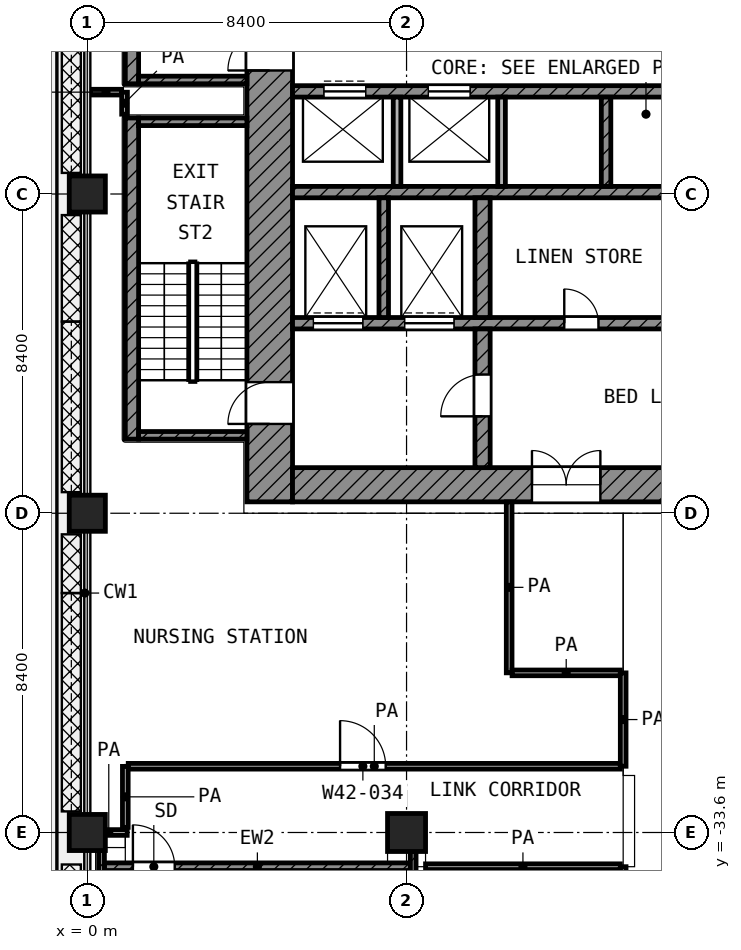
"""IFC4 building model, lengths in metres.
Left out: names, types, materials, properties, quantities, classifications, styles, units other than length and angle.
Written with IfcOpenShell. Run it as: python <this file> out.ifc"""

import sys

from ifc_helpers import new_model, si_unit, direction, frame, frame_2d, origin, origin_2d, place, context, subcontext, project, spatial, rectangle, extrude, element, fill, save


model = new_model("IFC4")
c1 = context("Model", 3, precision=1e-05, world=origin(), true_north=direction((0.0, 1.0)))
c2 = subcontext(c1, "Body", "Model", "MODEL_VIEW")
j1 = project(units=[si_unit("LENGTHUNIT", "METRE"), si_unit("PLANEANGLEUNIT", "RADIAN")], contexts=[c1])
p1 = place(None, origin())
s1 = spatial("IfcSite", under=j1, at=p1, CompositionType="ELEMENT")
p2 = place(p1, origin())
s2 = spatial("IfcBuilding", under=s1, at=p2, CompositionType="ELEMENT")
p3 = place(p2, frame((0.0, 0.0, 204.6)))
s3 = spatial("IfcBuildingStorey", under=s2, at=p3, CompositionType="ELEMENT", Elevation=204.6)
for number, where, z_axis, x_axis in (
    (1, (0.0, -16.8, 0.0), (0.0, 0.0, 1.0), (1.0, 0.0, 0.0)),
    (2, (0.0, -25.2, 0.0), (0.0, 0.0, 1.0), (1.0, 0.0, 0.0)),
    (3, (0.0, -33.6, 0.0), (0.0, 0.0, 1.0), (1.0, 0.0, 0.0)),
):
    element("IfcColumn", number, at=place(p3, frame(where, z_axis=z_axis, x_axis=x_axis)), inside=s3, PredefinedType="COLUMN", context=c2, shape_type="SweptSolid", body=[
        extrude(rectangle(XDim=0.95, YDim=0.95, at=origin_2d()), origin(), (0.0, 0.0, 1.0), 4.2),
    ])
p4 = place(p3, frame((8.4, -33.6, 0.0), z_axis=(0.0, 0.0, 1.0), x_axis=(1.0, 0.0, 0.0)))
e4 = element("IfcColumn", 4, at=p4, inside=s3, PredefinedType="COLUMN", context=c2, shape_type="SweptSolid", body=[
    extrude(rectangle(XDim=1.0, YDim=1.0, at=origin_2d()), origin(), (0.0, 0.0, 1.0), 4.2),
])
p5 = place(p3, frame((4.8, -24.9, 0.0), z_axis=(0.0, 0.0, 1.0), x_axis=(0.0, 1.0, 0.0)))
e5 = element("IfcWall", 5, at=p5, inside=s3, PredefinedType="SHEAR", context=c2, shape_type="SweptSolid", body=[
    extrude(rectangle(XDim=19.5, YDim=1.2, at=frame_2d((9.75, 0.0))), origin(), (0.0, 0.0, 1.0), 3.6),
])
p6 = place(p5, frame((11.35, 0.0, 0.0)))
e6 = element("IfcOpeningElement", 6, at=p6, cuts=e5, PredefinedType="OPENING", context=c2, shape_type="SweptSolid", body=[
    extrude(rectangle(XDim=1.1, YDim=2.1, at=frame_2d((0.55, 1.05))), frame((0.0, 0.61, 0.0), z_axis=(0.0, -1.0, 0.0), x_axis=(1.0, 0.0, 0.0)), (0.0, 0.0, 1.0), 1.22),
])
p7 = place(p5, frame((2.05, 0.0, 0.0)))
e7 = element("IfcOpeningElement", 7, at=p7, cuts=e5, PredefinedType="OPENING", context=c2, shape_type="SweptSolid", body=[
    extrude(rectangle(XDim=1.1, YDim=2.1, at=frame_2d((0.55, 1.05))), frame((0.0, 0.61, 0.0), z_axis=(0.0, -1.0, 0.0), x_axis=(1.0, 0.0, 0.0)), (0.0, 0.0, 1.0), 1.22),
])
p8 = place(p3, frame((5.4, -24.45, 0.0), z_axis=(0.0, 0.0, 1.0), x_axis=(1.0, 0.0, 0.0)))
e8 = element("IfcWall", 8, at=p8, inside=s3, PredefinedType="SHEAR", context=c2, shape_type="SweptSolid", body=[
    extrude(rectangle(XDim=18.6, YDim=0.9, at=frame_2d((9.3, 0.0))), origin(), (0.0, 0.0, 1.0), 3.6),
])
p9 = place(p8, frame((6.3, 0.0, 0.0)))
e9 = element("IfcOpeningElement", 9, at=p9, cuts=e8, PredefinedType="OPENING", context=c2, shape_type="SweptSolid", body=[
    extrude(rectangle(XDim=1.8, YDim=2.1, at=frame_2d((0.9, 1.05))), frame((0.0, 0.46, 0.0), z_axis=(0.0, -1.0, 0.0), x_axis=(1.0, 0.0, 0.0)), (0.0, 0.0, 1.0), 0.92),
])
p10 = place(p3, frame((5.4, -14.1, 0.0), z_axis=(0.0, 0.0, 1.0), x_axis=(1.0, 0.0, 0.0)))
e10 = element("IfcWall", 10, at=p10, inside=s3, PredefinedType="SHEAR", context=c2, shape_type="SweptSolid", body=[
    extrude(rectangle(XDim=16.65, YDim=0.3, at=frame_2d((8.325, 0.0))), origin(), (0.0, 0.0, 1.0), 3.6),
])
p11 = place(p10, frame((0.825, 0.0, 0.0)))
e11 = element("IfcOpeningElement", 11, at=p11, cuts=e10, PredefinedType="OPENING", context=c2, shape_type="SweptSolid", body=[
    extrude(rectangle(XDim=1.1, YDim=2.1, at=frame_2d((0.55, 1.05))), frame((0.0, 0.16, 0.0), z_axis=(0.0, -1.0, 0.0), x_axis=(1.0, 0.0, 0.0)), (0.0, 0.0, 1.0), 0.32),
])
p12 = place(p10, frame((3.575, 0.0, 0.0)))
e12 = element("IfcOpeningElement", 12, at=p12, cuts=e10, PredefinedType="OPENING", context=c2, shape_type="SweptSolid", body=[
    extrude(rectangle(XDim=1.1, YDim=2.1, at=frame_2d((0.55, 1.05))), frame((0.0, 0.16, 0.0), z_axis=(0.0, -1.0, 0.0), x_axis=(1.0, 0.0, 0.0)), (0.0, 0.0, 1.0), 0.32),
])
p13 = place(p3, frame((5.4, -16.75, 0.0), z_axis=(0.0, 0.0, 1.0), x_axis=(1.0, 0.0, 0.0)))
e13 = element("IfcWall", 13, at=p13, inside=s3, PredefinedType="SHEAR", context=c2, shape_type="SweptSolid", body=[
    extrude(rectangle(XDim=16.65, YDim=0.3, at=frame_2d((8.325, 0.0))), origin(), (0.0, 0.0, 1.0), 3.6),
])
p14 = place(p3, frame((5.4, -20.2, 0.0), z_axis=(0.0, 0.0, 1.0), x_axis=(1.0, 0.0, 0.0)))
e14 = element("IfcWall", 14, at=p14, inside=s3, PredefinedType="SHEAR", context=c2, shape_type="SweptSolid", body=[
    extrude(rectangle(XDim=14.65, YDim=0.3, at=frame_2d((7.325, 0.0))), origin(), (0.0, 0.0, 1.0), 3.6),
])
p15 = place(p14, frame((10.55, 0.0, 0.0)))
e15 = element("IfcOpeningElement", 15, at=p15, cuts=e14, PredefinedType="OPENING", context=c2, shape_type="SweptSolid", body=[
    extrude(rectangle(XDim=1.3, YDim=2.1, at=frame_2d((0.65, 1.05))), frame((0.0, 0.16, 0.0), z_axis=(0.0, -1.0, 0.0), x_axis=(1.0, 0.0, 0.0)), (0.0, 0.0, 1.0), 0.32),
])
p16 = place(p14, frame((12.95, 0.0, 0.0)))
e16 = element("IfcOpeningElement", 16, at=p16, cuts=e14, PredefinedType="OPENING", context=c2, shape_type="SweptSolid", body=[
    extrude(rectangle(XDim=1.3, YDim=2.1, at=frame_2d((0.65, 1.05))), frame((0.0, 0.16, 0.0), z_axis=(0.0, -1.0, 0.0), x_axis=(1.0, 0.0, 0.0)), (0.0, 0.0, 1.0), 0.32),
])
p17 = place(p14, frame((0.55, 0.0, 0.0)))
e17 = element("IfcOpeningElement", 17, at=p17, cuts=e14, PredefinedType="OPENING", context=c2, shape_type="SweptSolid", body=[
    extrude(rectangle(XDim=1.3, YDim=2.1, at=frame_2d((0.65, 1.05))), frame((0.0, 0.16, 0.0), z_axis=(0.0, -1.0, 0.0), x_axis=(1.0, 0.0, 0.0)), (0.0, 0.0, 1.0), 0.32),
])
p18 = place(p14, frame((2.95, 0.0, 0.0)))
e18 = element("IfcOpeningElement", 18, at=p18, cuts=e14, PredefinedType="OPENING", context=c2, shape_type="SweptSolid", body=[
    extrude(rectangle(XDim=1.3, YDim=2.1, at=frame_2d((0.65, 1.05))), frame((0.0, 0.16, 0.0), z_axis=(0.0, -1.0, 0.0), x_axis=(1.0, 0.0, 0.0)), (0.0, 0.0, 1.0), 0.32),
])
p19 = place(p14, frame((7.15, 0.0, 0.0)))
e19 = element("IfcOpeningElement", 19, at=p19, cuts=e14, PredefinedType="OPENING", context=c2, shape_type="SweptSolid", body=[
    extrude(rectangle(XDim=0.9, YDim=2.1, at=frame_2d((0.45, 1.05))), frame((0.0, 0.16, 0.0), z_axis=(0.0, -1.0, 0.0), x_axis=(1.0, 0.0, 0.0)), (0.0, 0.0, 1.0), 0.32),
])
p20 = place(p3, frame((10.4, -24.0, 0.0), z_axis=(0.0, 0.0, 1.0), x_axis=(0.0, 1.0, 0.0)))
e20 = element("IfcWall", 20, at=p20, inside=s3, PredefinedType="SHEAR", context=c2, shape_type="SweptSolid", body=[
    extrude(rectangle(XDim=3.65, YDim=0.4, at=frame_2d((1.825, 0.0))), origin(), (0.0, 0.0, 1.0), 3.6),
])
p21 = place(p20, frame((1.35, 0.0, 0.0)))
e21 = element("IfcOpeningElement", 21, at=p21, cuts=e20, PredefinedType="OPENING", context=c2, shape_type="SweptSolid", body=[
    extrude(rectangle(XDim=1.1, YDim=2.1, at=frame_2d((0.55, 1.05))), frame((0.0, 0.21, 0.0), z_axis=(0.0, -1.0, 0.0), x_axis=(1.0, 0.0, 0.0)), (0.0, 0.0, 1.0), 0.42),
])
p22 = place(p3, frame((10.4, -20.05, 0.0), z_axis=(0.0, 0.0, 1.0), x_axis=(0.0, 1.0, 0.0)))
e22 = element("IfcWall", 22, at=p22, inside=s3, PredefinedType="SHEAR", context=c2, shape_type="SweptSolid", body=[
    extrude(rectangle(XDim=3.15, YDim=0.4, at=frame_2d((1.575, 0.0))), origin(), (0.0, 0.0, 1.0), 3.6),
])
p23 = place(p3, frame((7.8, -20.05, 0.0), z_axis=(0.0, 0.0, 1.0), x_axis=(0.0, 1.0, 0.0)))
e23 = element("IfcWall", 23, at=p23, inside=s3, PredefinedType="SHEAR", context=c2, shape_type="SweptSolid", body=[
    extrude(rectangle(XDim=3.15, YDim=0.25, at=frame_2d((1.575, 0.0))), origin(), (0.0, 0.0, 1.0), 3.6),
])
for number, where, z_axis, x_axis in (
    (24, (8.15, -16.6, 0.0), (0.0, 0.0, 1.0), (0.0, 1.0, 0.0)),
    (25, (10.9, -16.6, 0.0), (0.0, 0.0, 1.0), (0.0, 1.0, 0.0)),
):
    element("IfcWall", number, at=place(p3, frame(where, z_axis=z_axis, x_axis=x_axis)), inside=s3, PredefinedType="PARTITIONING", context=c2, shape_type="SweptSolid", body=[
        extrude(rectangle(XDim=2.35, YDim=0.2, at=frame_2d((1.175, 0.0))), origin(), (0.0, 0.0, 1.0), 3.6),
    ])
p24 = place(p3, frame((13.65, -16.6, 0.0), z_axis=(0.0, 0.0, 1.0), x_axis=(0.0, 1.0, 0.0)))
e26 = element("IfcWall", 26, at=p24, inside=s3, PredefinedType="SHEAR", context=c2, shape_type="SweptSolid", body=[
    extrude(rectangle(XDim=2.35, YDim=0.25, at=frame_2d((1.175, 0.0))), origin(), (0.0, 0.0, 1.0), 3.6),
])
p25 = place(p3, frame((1.175, -13.9, 0.0), z_axis=(0.0, 0.0, 1.0), x_axis=(0.0, 1.0, 0.0)))
e27 = element("IfcWall", 27, at=p25, inside=s3, PredefinedType="SHEAR", context=c2, shape_type="SweptSolid", body=[
    extrude(rectangle(XDim=8.45, YDim=0.35, at=frame_2d((4.225, 0.0))), origin(), (0.0, 0.0, 1.0), 3.6),
])
p26 = place(p3, frame((1.35, -13.8, 0.0), z_axis=(0.0, 0.0, 1.0), x_axis=(1.0, 0.0, 0.0)))
e28 = element("IfcWall", 28, at=p26, inside=s3, PredefinedType="SHEAR", context=c2, shape_type="SweptSolid", body=[
    extrude(rectangle(XDim=2.85, YDim=0.2, at=frame_2d((1.425, 0.0))), origin(), (0.0, 0.0, 1.0), 3.6),
])
p27 = place(p3, frame((1.175, -23.25, 0.0), z_axis=(0.0, 0.0, 1.0), x_axis=(0.0, 1.0, 0.0)))
e29 = element("IfcWall", 29, at=p27, inside=s3, PredefinedType="SHEAR", context=c2, shape_type="SweptSolid", body=[
    extrude(rectangle(XDim=8.45, YDim=0.35, at=frame_2d((4.225, 0.0))), origin(), (0.0, 0.0, 1.0), 3.6),
])
for number, where, z_axis, x_axis in (
    (30, (1.35, -14.9, 0.0), (0.0, 0.0, 1.0), (1.0, 0.0, 0.0)),
    (31, (1.35, -23.15, 0.0), (0.0, 0.0, 1.0), (1.0, 0.0, 0.0)),
):
    element("IfcWall", number, at=place(p3, frame(where, z_axis=z_axis, x_axis=x_axis)), inside=s3, PredefinedType="SHEAR", context=c2, shape_type="SweptSolid", body=[
        extrude(rectangle(XDim=2.85, YDim=0.2, at=frame_2d((1.425, 0.0))), origin(), (0.0, 0.0, 1.0), 3.6),
    ])
p28 = place(p3, frame((0.375, -40.05, 0.0), z_axis=(0.0, 0.0, 1.0), x_axis=(0.0, 1.0, 0.0)))
e32 = element("IfcWall", 32, at=p28, inside=s3, PredefinedType="SHEAR", context=c2, shape_type="SweptSolid", body=[
    extrude(rectangle(XDim=5.975, YDim=0.15, at=frame_2d((2.988, 0.0))), origin(), (0.0, 0.0, 1.0), 3.6),
])
p29 = place(p3, frame((8.575, -40.05, 0.0), z_axis=(0.0, 0.0, 1.0), x_axis=(0.0, 1.0, 0.0)))
e33 = element("IfcWall", 33, at=p29, inside=s3, PredefinedType="SHEAR", context=c2, shape_type="SweptSolid", body=[
    extrude(rectangle(XDim=5.95, YDim=0.15, at=frame_2d((2.975, 0.0))), origin(), (0.0, 0.0, 1.0), 3.6),
])
p30 = place(p3, frame((0.45, -34.5, 0.0), z_axis=(0.0, 0.0, 1.0), x_axis=(1.0, 0.0, 0.0)))
e34 = element("IfcWall", 34, at=p30, inside=s3, PredefinedType="SHEAR", context=c2, shape_type="SweptSolid", body=[
    extrude(rectangle(XDim=8.05, YDim=0.2, at=frame_2d((4.025, 0.0))), origin(), (0.0, 0.0, 1.0), 3.6),
])
p31 = place(p30, frame((0.75, 0.0, 0.0)))
e35 = element("IfcOpeningElement", 35, at=p31, cuts=e34, PredefinedType="OPENING", context=c2, shape_type="SweptSolid", body=[
    extrude(rectangle(XDim=1.1, YDim=2.1, at=frame_2d((0.55, 1.05))), frame((0.0, 0.11, 0.0), z_axis=(0.0, -1.0, 0.0), x_axis=(1.0, 0.0, 0.0)), (0.0, 0.0, 1.0), 0.22),
])
p32 = place(p3, frame((8.9, -34.5, 0.0), z_axis=(0.0, 0.0, 1.0), x_axis=(1.0, 0.0, 0.0)))
e36 = element("IfcWall", 36, at=p32, inside=s3, PredefinedType="PARTITIONING", context=c2, shape_type="SweptSolid", body=[
    extrude(rectangle(XDim=5.125, YDim=0.15, at=frame_2d((2.562, 0.0))), origin(), (0.0, 0.0, 1.0), 3.6),
])
p33 = place(p3, frame((0.08, -33.6, 0.0), z_axis=(0.0, 0.0, 1.0), x_axis=(1.0, 0.0, 0.0)))
e37 = element("IfcWall", 37, at=p33, inside=s3, PredefinedType="PARTITIONING", context=c2, shape_type="SweptSolid", body=[
    extrude(rectangle(XDim=0.97, YDim=0.15, at=frame_2d((0.485, 0.0))), origin(), (0.0, 0.0, 1.0), 3.6),
])
p34 = place(p3, frame((1.077, -31.857, 0.0), z_axis=(0.0, 0.0, 1.0), x_axis=(1.0, 0.0, 0.0)))
e38 = element("IfcWall", 38, at=p34, inside=s3, PredefinedType="PARTITIONING", context=c2, shape_type="SweptSolid", body=[
    extrude(rectangle(XDim=12.948, YDim=0.15, at=frame_2d((6.474, 0.0))), origin(), (0.0, 0.0, 1.0), 3.6),
])
p35 = place(p34, frame((5.574, 0.0, 0.0)))
e39 = element("IfcOpeningElement", 39, at=p35, cuts=e38, PredefinedType="OPENING", context=c2, shape_type="SweptSolid", body=[
    extrude(rectangle(XDim=1.2, YDim=2.1, at=frame_2d((0.6, 1.05))), frame((0.0, 0.085, 0.0), z_axis=(0.0, -1.0, 0.0), x_axis=(1.0, 0.0, 0.0)), (0.0, 0.0, 1.0), 0.17),
])
p36 = place(p3, frame((11.177, -29.4, 0.0), z_axis=(0.0, 0.0, 1.0), x_axis=(1.0, 0.0, 0.0)))
e40 = element("IfcWall", 40, at=p36, inside=s3, PredefinedType="PARTITIONING", context=c2, shape_type="SweptSolid", body=[
    extrude(rectangle(XDim=2.848, YDim=0.15, at=frame_2d((1.424, 0.0))), origin(), (0.0, 0.0, 1.0), 3.6),
])
p37 = place(p3, frame((0.08, -14.12, 0.0), z_axis=(0.0, 0.0, 1.0), x_axis=(1.0, 0.0, 0.0)))
e41 = element("IfcWall", 41, at=p37, inside=s3, PredefinedType="PARTITIONING", context=c2, shape_type="SweptSolid", body=[
    extrude(rectangle(XDim=0.824, YDim=0.15, at=frame_2d((0.412, 0.0))), origin(), (0.0, 0.0, 1.0), 3.6),
])
p38 = place(p3, frame((0.98, -14.7, 0.0), z_axis=(0.0, 0.0, 1.0), x_axis=(0.0, 1.0, 0.0)))
e42 = element("IfcWall", 42, at=p38, inside=s3, PredefinedType="PARTITIONING", context=c2, shape_type="SweptSolid", body=[
    extrude(rectangle(XDim=0.578, YDim=0.15, at=frame_2d((0.289, 0.0))), origin(), (0.0, 0.0, 1.0), 3.6),
])
p39 = place(p3, frame((1.0, -33.465, 0.0), z_axis=(0.0, 0.0, 1.0), x_axis=(0.0, 1.0, 0.0)))
e43 = element("IfcWall", 43, at=p39, inside=s3, PredefinedType="PARTITIONING", context=c2, shape_type="SweptSolid", body=[
    extrude(rectangle(XDim=1.606, YDim=0.15, at=frame_2d((0.803, 0.0))), origin(), (0.0, 0.0, 1.0), 3.6),
])
p40 = place(p3, frame((11.1, -29.399, 0.0), z_axis=(0.0, 0.0, 1.0), x_axis=(0.0, 1.0, 0.0)))
e44 = element("IfcWall", 44, at=p40, inside=s3, PredefinedType="PARTITIONING", context=c2, shape_type="SweptSolid", body=[
    extrude(rectangle(XDim=4.499, YDim=0.15, at=frame_2d((2.25, 0.0))), origin(), (0.0, 0.0, 1.0), 3.6),
])
p41 = place(p3, frame((14.1, -39.95, 0.0), z_axis=(0.0, 0.0, 1.0), x_axis=(0.0, 1.0, 0.0)))
e45 = element("IfcWall", 45, at=p41, inside=s3, PredefinedType="PARTITIONING", context=c2, shape_type="SweptSolid", body=[
    extrude(rectangle(XDim=5.45, YDim=0.15, at=frame_2d((2.725, 0.0))), origin(), (0.0, 0.0, 1.0), 3.6),
])
p42 = place(p41, frame((2.225, 0.0, 0.0)))
e46 = element("IfcOpeningElement", 46, at=p42, cuts=e45, PredefinedType="OPENING", context=c2, shape_type="SweptSolid", body=[
    extrude(rectangle(XDim=1.0, YDim=2.1, at=frame_2d((0.5, 1.05))), frame((0.0, 0.085, 0.0), z_axis=(0.0, -1.0, 0.0), x_axis=(1.0, 0.0, 0.0)), (0.0, 0.0, 1.0), 0.17),
])
p43 = place(p3, frame((14.1, -31.857, 0.0), z_axis=(0.0, 0.0, 1.0), x_axis=(0.0, 1.0, 0.0)))
e47 = element("IfcWall", 47, at=p43, inside=s3, PredefinedType="PARTITIONING", context=c2, shape_type="SweptSolid", body=[
    extrude(rectangle(XDim=2.457, YDim=0.15, at=frame_2d((1.229, 0.0))), origin(), (0.0, 0.0, 1.0), 3.6),
])
p44 = place(p11, origin())
e48 = element("IfcDoor", 48, at=p44, inside=s3, OperationType="DOUBLE_DOOR_SLIDING", PredefinedType="DOOR", context=c2, shape_type="SweptSolid", body=[
    extrude(rectangle(XDim=1.1, YDim=2.1, at=frame_2d((0.55, 1.05))), frame((0.0, 0.025, 0.0), z_axis=(0.0, -1.0, 0.0), x_axis=(1.0, 0.0, 0.0)), (0.0, 0.0, 1.0), 0.05),
])
fill(e11, e48)
p45 = place(p12, origin())
e49 = element("IfcDoor", 49, at=p45, inside=s3, OperationType="DOUBLE_DOOR_SLIDING", PredefinedType="DOOR", context=c2, shape_type="SweptSolid", body=[
    extrude(rectangle(XDim=1.1, YDim=2.1, at=frame_2d((0.55, 1.05))), frame((0.0, 0.025, 0.0), z_axis=(0.0, -1.0, 0.0), x_axis=(1.0, 0.0, 0.0)), (0.0, 0.0, 1.0), 0.05),
])
fill(e12, e49)
p46 = place(p17, origin())
e50 = element("IfcDoor", 50, at=p46, inside=s3, OperationType="DOUBLE_DOOR_SLIDING", PredefinedType="DOOR", context=c2, shape_type="SweptSolid", body=[
    extrude(rectangle(XDim=1.3, YDim=2.1, at=frame_2d((0.65, 1.05))), frame((0.0, 0.025, 0.0), z_axis=(0.0, -1.0, 0.0), x_axis=(1.0, 0.0, 0.0)), (0.0, 0.0, 1.0), 0.05),
])
fill(e17, e50)
p47 = place(p18, origin())
e51 = element("IfcDoor", 51, at=p47, inside=s3, OperationType="DOUBLE_DOOR_SLIDING", PredefinedType="DOOR", context=c2, shape_type="SweptSolid", body=[
    extrude(rectangle(XDim=1.3, YDim=2.1, at=frame_2d((0.65, 1.05))), frame((0.0, 0.025, 0.0), z_axis=(0.0, -1.0, 0.0), x_axis=(1.0, 0.0, 0.0)), (0.0, 0.0, 1.0), 0.05),
])
fill(e18, e51)
p48 = place(p6, origin())
e52 = element("IfcDoor", 52, at=p48, inside=s3, OperationType="SINGLE_SWING_LEFT", PredefinedType="DOOR", context=c2, shape_type="SweptSolid", body=[
    extrude(rectangle(XDim=1.1, YDim=2.1, at=frame_2d((0.55, 1.05))), frame((0.0, 0.025, 0.0), z_axis=(0.0, -1.0, 0.0), x_axis=(1.0, 0.0, 0.0)), (0.0, 0.0, 1.0), 0.05),
])
fill(e6, e52)
p49 = place(p7, origin())
e53 = element("IfcDoor", 53, at=p49, inside=s3, OperationType="SINGLE_SWING_LEFT", PredefinedType="DOOR", context=c2, shape_type="SweptSolid", body=[
    extrude(rectangle(XDim=1.1, YDim=2.1, at=frame_2d((0.55, 1.05))), frame((0.0, 0.025, 0.0), z_axis=(0.0, -1.0, 0.0), x_axis=(1.0, 0.0, 0.0)), (0.0, 0.0, 1.0), 0.05),
])
fill(e7, e53)
p50 = place(p21, origin())
e54 = element("IfcDoor", 54, at=p50, inside=s3, OperationType="SINGLE_SWING_LEFT", PredefinedType="DOOR", context=c2, shape_type="SweptSolid", body=[
    extrude(rectangle(XDim=1.1, YDim=2.1, at=frame_2d((0.55, 1.05))), frame((0.0, 0.025, 0.0), z_axis=(0.0, -1.0, 0.0), x_axis=(1.0, 0.0, 0.0)), (0.0, 0.0, 1.0), 0.05),
])
fill(e21, e54)
p51 = place(p9, origin())
e55 = element("IfcDoor", 55, at=p51, inside=s3, OperationType="DOUBLE_DOOR_SINGLE_SWING", PredefinedType="DOOR", context=c2, shape_type="SweptSolid", body=[
    extrude(rectangle(XDim=1.8, YDim=2.1, at=frame_2d((0.9, 1.05))), frame((0.0, 0.025, 0.0), z_axis=(0.0, -1.0, 0.0), x_axis=(1.0, 0.0, 0.0)), (0.0, 0.0, 1.0), 0.05),
])
fill(e9, e55)
p52 = place(p19, origin())
e56 = element("IfcDoor", 56, at=p52, inside=s3, OperationType="SINGLE_SWING_LEFT", PredefinedType="DOOR", context=c2, shape_type="SweptSolid", body=[
    extrude(rectangle(XDim=0.9, YDim=2.1, at=frame_2d((0.45, 1.05))), frame((0.0, 0.025, 0.0), z_axis=(0.0, -1.0, 0.0), x_axis=(1.0, 0.0, 0.0)), (0.0, 0.0, 1.0), 0.05),
])
fill(e19, e56)
p53 = place(p31, origin())
e57 = element("IfcDoor", 57, at=p53, inside=s3, OperationType="SINGLE_SWING_LEFT", PredefinedType="DOOR", context=c2, shape_type="SweptSolid", body=[
    extrude(rectangle(XDim=1.1, YDim=2.1, at=frame_2d((0.55, 1.05))), frame((0.0, 0.025, 0.0), z_axis=(0.0, -1.0, 0.0), x_axis=(1.0, 0.0, 0.0)), (0.0, 0.0, 1.0), 0.05),
])
fill(e35, e57)
p54 = place(p35, origin())
e58 = element("IfcDoor", 58, at=p54, inside=s3, OperationType="SINGLE_SWING_LEFT", PredefinedType="DOOR", context=c2, shape_type="SweptSolid", body=[
    extrude(rectangle(XDim=1.2, YDim=2.1, at=frame_2d((0.6, 1.05))), frame((0.0, 0.025, 0.0), z_axis=(0.0, -1.0, 0.0), x_axis=(1.0, 0.0, 0.0)), (0.0, 0.0, 1.0), 0.05),
])
fill(e39, e58)
save(model, sys.argv[1])
